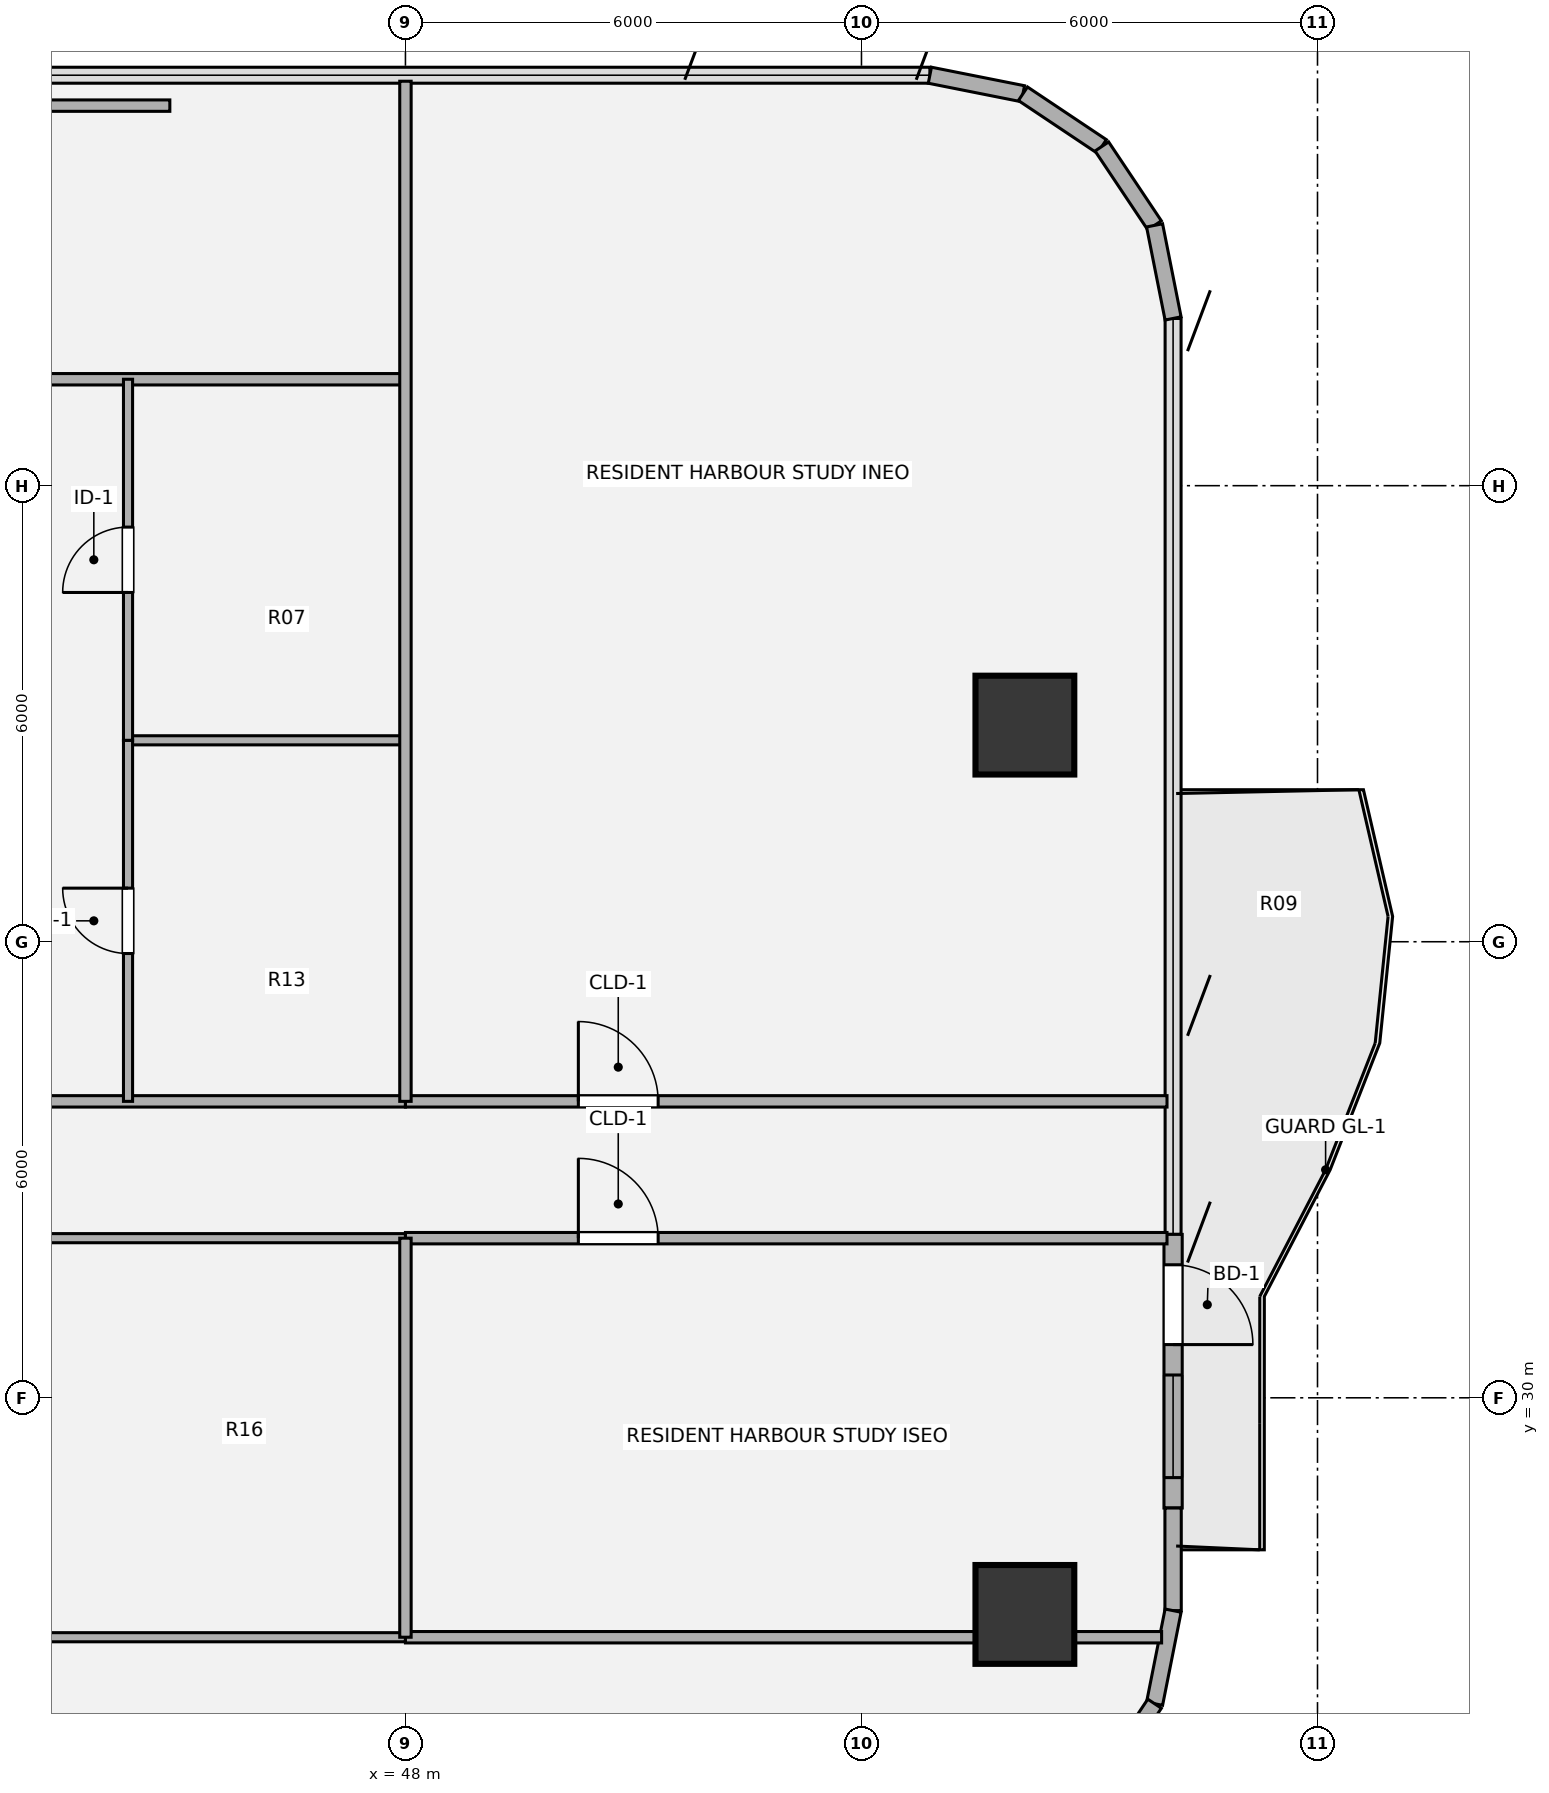
"""IFC4 building model, lengths in metres.
Left out: names, types, materials, properties, quantities, classifications, styles, units other than length and angle.
Written with IfcOpenShell. Run it as: python <this file> out.ifc"""

import sys

from ifc_helpers import new_model, si_unit, direction, frame, frame_2d, origin, origin_2d, place, context, subcontext, project, spatial, rectangle, hollow_circle, extrude, source, transform, mapped, element, fill, save


model = new_model("IFC4")
c1 = context("Model", 3, precision=1e-05, world=origin(), true_north=direction((0.0, 1.0)))
c2 = subcontext(c1, "Body", "Model", "MODEL_VIEW")
j1 = project(units=[si_unit("LENGTHUNIT", "METRE"), si_unit("PLANEANGLEUNIT", "RADIAN")], contexts=[c1])
p1 = place(None, origin())
s1 = spatial("IfcSite", under=j1, at=p1, CompositionType="ELEMENT")
p2 = place(p1, origin())
s2 = spatial("IfcBuilding", under=s1, at=p2, CompositionType="ELEMENT")
p3 = place(p2, frame((0.0, 0.0, 93.6)))
s3 = spatial("IfcBuildingStorey", under=s2, at=p3, CompositionType="ELEMENT", Elevation=93.6)
m1 = source(origin(), c2, "Body", "SweptSolid", [
    extrude(hollow_circle(Radius=0.65, WallThickness=0.045, at=origin_2d()), origin(), (0.0, 0.0, 1.0), 3.78),
])
for number, where, z_axis, x_axis in (
    (1, (56.15, 27.15, 0.0), (0.0, 0.0, 1.0), (1.0, 0.0, 0.0)),
    (2, (56.15, 38.85, 0.0), (0.0, 0.0, 1.0), (1.0, 0.0, 0.0)),
):
    element("IfcColumn", number, at=place(p3, frame(where, z_axis=z_axis, x_axis=x_axis)), inside=s3, PredefinedType="COLUMN", context=c2, shape_type="MappedRepresentation", body=[
        mapped(m1, transform((0.0, 0.0, 0.0), x_axis=(1.0, 0.0, 0.0), y_axis=(0.0, 1.0, 0.0), z_axis=(0.0, 0.0, 1.0), scale=1.0)),
    ])
for number, where, z_axis, x_axis in (
    (3, (54.9, 47.4, 0.0), (0.0, 0.0, 1.0), (0.981, -0.195, 0.0)),
    (4, (56.125, 47.156, 0.0), (0.0, 0.0, 1.0), (0.831, -0.556, 0.0)),
    (5, (57.163, 46.463, 0.0), (0.0, 0.0, 1.0), (0.556, -0.831, 0.0)),
    (6, (57.856, 45.425, 0.0), (0.0, 0.0, 1.0), (0.195, -0.981, 0.0)),
):
    element("IfcWall", number, at=place(p3, frame(where, z_axis=z_axis, x_axis=x_axis)), inside=s3, PredefinedType="SOLIDWALL", context=c2, shape_type="SweptSolid", body=[
        extrude(rectangle(XDim=1.249, YDim=0.215, at=frame_2d((0.624, 0.0))), origin(), (0.0, 0.0, 1.0), 3.53),
    ])
p4 = place(p3, frame((58.1, 32.15, 0.0), z_axis=(0.0, 0.0, 1.0), x_axis=(0.0, -1.0, 0.0)))
e7 = element("IfcWall", 7, at=p4, inside=s3, PredefinedType="SOLIDWALL", context=c2, shape_type="SweptSolid", body=[
    extrude(rectangle(XDim=3.6, YDim=0.24, at=frame_2d((1.8, 0.0))), origin(), (0.0, 0.0, 1.0), 3.53),
])
p5 = place(p4, frame((0.4, 0.0, 0.0)))
e8 = element("IfcOpeningElement", 8, at=p5, cuts=e7, PredefinedType="OPENING", context=c2, shape_type="SweptSolid", body=[
    extrude(rectangle(XDim=1.05, YDim=2.15, at=origin_2d()), frame((0.525, 0.13, 1.075), z_axis=(0.0, -1.0, 0.0), x_axis=(1.0, 0.0, 0.0)), (0.0, 0.0, 1.0), 0.26),
])
p6 = place(p4, frame((1.85, 0.0, 0.85)))
e9 = element("IfcOpeningElement", 9, at=p6, cuts=e7, PredefinedType="OPENING", context=c2, shape_type="SweptSolid", body=[
    extrude(rectangle(XDim=1.35, YDim=1.35, at=origin_2d()), frame((0.675, 0.13, 0.675), z_axis=(0.0, -1.0, 0.0), x_axis=(1.0, 0.0, 0.0)), (0.0, 0.0, 1.0), 0.26),
])
p7 = place(p3, frame((58.1, 28.55, 0.0), z_axis=(0.0, 0.0, 1.0), x_axis=(0.0, -1.0, 0.0)))
e10 = element("IfcWall", 10, at=p7, inside=s3, PredefinedType="SOLIDWALL", context=c2, shape_type="SweptSolid", body=[
    extrude(rectangle(XDim=1.35, YDim=0.215, at=frame_2d((0.675, 0.0))), origin(), (0.0, 0.0, 1.0), 3.53),
])
for number, where, z_axis, x_axis in (
    (11, (58.1, 27.2, 0.0), (0.0, 0.0, 1.0), (-0.195, -0.981, 0.0)),
    (12, (57.856, 25.975, 0.0), (0.0, 0.0, 1.0), (-0.556, -0.831, 0.0)),
):
    element("IfcWall", number, at=place(p3, frame(where, z_axis=z_axis, x_axis=x_axis)), inside=s3, PredefinedType="SOLIDWALL", context=c2, shape_type="SweptSolid", body=[
        extrude(rectangle(XDim=1.249, YDim=0.215, at=frame_2d((0.624, 0.0))), origin(), (0.0, 0.0, 1.0), 3.53),
    ])
p8 = place(p3, frame((43.1, 26.85, 0.0), z_axis=(0.0, 0.0, 1.0), x_axis=(1.0, 0.0, 0.0)))
e13 = element("IfcWall", 13, at=p8, inside=s3, PredefinedType="PARTITIONING", context=c2, shape_type="SweptSolid", body=[
    extrude(rectangle(XDim=4.9, YDim=0.12, at=frame_2d((2.45, 0.0))), origin(), (0.0, 0.0, 1.0), 3.055),
])
p9 = place(p3, frame((48.0, 26.85, 0.0), z_axis=(0.0, 0.0, 1.0), x_axis=(1.0, 0.0, 0.0)))
e14 = element("IfcWall", 14, at=p9, inside=s3, PredefinedType="PARTITIONING", context=c2, shape_type="SweptSolid", body=[
    extrude(rectangle(XDim=9.949, YDim=0.15, at=frame_2d((4.974, 0.0))), origin(), (0.0, 0.0, 1.0), 3.055),
])
p10 = place(p3, frame((43.1, 32.1, 0.0), z_axis=(0.0, 0.0, 1.0), x_axis=(1.0, 0.0, 0.0)))
e15 = element("IfcWall", 15, at=p10, inside=s3, PredefinedType="PARTITIONING", context=c2, shape_type="SweptSolid", body=[
    extrude(rectangle(XDim=4.9, YDim=0.12, at=frame_2d((2.45, 0.0))), origin(), (0.0, 0.0, 1.0), 2.982),
])
p11 = place(p3, frame((48.0, 32.1, 0.0), z_axis=(0.0, 0.0, 1.0), x_axis=(1.0, 0.0, 0.0)))
e16 = element("IfcWall", 16, at=p11, inside=s3, PredefinedType="PARTITIONING", context=c2, shape_type="SweptSolid", body=[
    extrude(rectangle(XDim=10.02, YDim=0.15, at=frame_2d((5.01, 0.0))), origin(), (0.0, 0.0, 1.0), 2.982),
])
p12 = place(p11, frame((2.275, 0.0, 0.0)))
e17 = element("IfcOpeningElement", 17, at=p12, cuts=e16, PredefinedType="OPENING", context=c2, shape_type="SweptSolid", body=[
    extrude(rectangle(XDim=1.05, YDim=2.1, at=origin_2d()), frame((0.525, 0.085, 1.05), z_axis=(0.0, -1.0, 0.0), x_axis=(1.0, 0.0, 0.0)), (0.0, 0.0, 1.0), 0.17),
])
p13 = place(p3, frame((36.9, 33.9, 0.0), z_axis=(0.0, 0.0, 1.0), x_axis=(1.0, 0.0, 0.0)))
e18 = element("IfcWall", 18, at=p13, inside=s3, PredefinedType="PARTITIONING", context=c2, shape_type="SweptSolid", body=[
    extrude(rectangle(XDim=11.1, YDim=0.15, at=frame_2d((5.55, 0.0))), origin(), (0.0, 0.0, 1.0), 2.982),
])
p14 = place(p3, frame((48.0, 33.9, 0.0), z_axis=(0.0, 0.0, 1.0), x_axis=(1.0, 0.0, 0.0)))
e19 = element("IfcWall", 19, at=p14, inside=s3, PredefinedType="PARTITIONING", context=c2, shape_type="SweptSolid", body=[
    extrude(rectangle(XDim=10.02, YDim=0.15, at=frame_2d((5.01, 0.0))), origin(), (0.0, 0.0, 1.0), 2.982),
])
p15 = place(p14, frame((2.275, 0.0, 0.0)))
e20 = element("IfcOpeningElement", 20, at=p15, cuts=e19, PredefinedType="OPENING", context=c2, shape_type="SweptSolid", body=[
    extrude(rectangle(XDim=1.05, YDim=2.1, at=origin_2d()), frame((0.525, 0.085, 1.05), z_axis=(0.0, -1.0, 0.0), x_axis=(1.0, 0.0, 0.0)), (0.0, 0.0, 1.0), 0.17),
])
p16 = place(p3, frame((44.35, 38.65, 0.0), z_axis=(0.0, 0.0, 1.0), x_axis=(1.0, 0.0, 0.0)))
e21 = element("IfcWall", 21, at=p16, inside=s3, PredefinedType="PARTITIONING", context=c2, shape_type="SweptSolid", body=[
    extrude(rectangle(XDim=3.65, YDim=0.12, at=frame_2d((1.825, 0.0))), origin(), (0.0, 0.0, 1.0), 2.903),
])
p17 = place(p3, frame((36.9, 43.4, 0.0), z_axis=(0.0, 0.0, 1.0), x_axis=(1.0, 0.0, 0.0)))
e22 = element("IfcWall", 22, at=p17, inside=s3, PredefinedType="PARTITIONING", context=c2, shape_type="SweptSolid", body=[
    extrude(rectangle(XDim=11.1, YDim=0.15, at=frame_2d((5.55, 0.0))), origin(), (0.0, 0.0, 1.0), 3.308),
])
p18 = place(p3, frame((27.1, 47.0, 0.0), z_axis=(0.0, 0.0, 1.0), x_axis=(1.0, 0.0, 0.0)))
e23 = element("IfcWall", 23, at=p18, inside=s3, PredefinedType="PARTITIONING", context=c2, shape_type="SweptSolid", body=[
    extrude(rectangle(XDim=17.8, YDim=0.15, at=frame_2d((8.9, 0.0))), origin(), (0.0, 0.0, 1.0), 3.308),
])
p19 = place(p18, frame((8.375, 0.0, 0.0)))
e24 = element("IfcOpeningElement", 24, at=p19, cuts=e23, PredefinedType="OPENING", context=c2, shape_type="SweptSolid", body=[
    extrude(rectangle(XDim=1.05, YDim=2.1, at=origin_2d()), frame((0.525, 0.085, 1.05), z_axis=(0.0, -1.0, 0.0), x_axis=(1.0, 0.0, 0.0)), (0.0, 0.0, 1.0), 0.17),
])
p20 = place(p3, frame((44.35, 33.9, 0.0), z_axis=(0.0, 0.0, 1.0), x_axis=(0.0, 1.0, 0.0)))
e25 = element("IfcWall", 25, at=p20, inside=s3, PredefinedType="PARTITIONING", context=c2, shape_type="SweptSolid", body=[
    extrude(rectangle(XDim=4.75, YDim=0.12, at=frame_2d((2.375, 0.0))), origin(), (0.0, 0.0, 1.0), 3.5),
])
p21 = place(p20, frame((1.945, 0.0, 0.0)))
e26 = element("IfcOpeningElement", 26, at=p21, cuts=e25, PredefinedType="OPENING", context=c2, shape_type="SweptSolid", body=[
    extrude(rectangle(XDim=0.86, YDim=2.1, at=origin_2d()), frame((0.43, 0.07, 1.05), z_axis=(0.0, -1.0, 0.0), x_axis=(1.0, 0.0, 0.0)), (0.0, 0.0, 1.0), 0.14),
])
p22 = place(p3, frame((44.35, 38.65, 0.0), z_axis=(0.0, 0.0, 1.0), x_axis=(0.0, 1.0, 0.0)))
e27 = element("IfcWall", 27, at=p22, inside=s3, PredefinedType="PARTITIONING", context=c2, shape_type="SweptSolid", body=[
    extrude(rectangle(XDim=4.75, YDim=0.12, at=frame_2d((2.375, 0.0))), origin(), (0.0, 0.0, 1.0), 3.5),
])
p23 = place(p22, frame((1.945, 0.0, 0.0)))
e28 = element("IfcOpeningElement", 28, at=p23, cuts=e27, PredefinedType="OPENING", context=c2, shape_type="SweptSolid", body=[
    extrude(rectangle(XDim=0.86, YDim=2.1, at=origin_2d()), frame((0.43, 0.07, 1.05), z_axis=(0.0, -1.0, 0.0), x_axis=(1.0, 0.0, 0.0)), (0.0, 0.0, 1.0), 0.14),
])
p24 = place(p3, frame((48.0, 26.85, 0.0), z_axis=(0.0, 0.0, 1.0), x_axis=(0.0, 1.0, 0.0)))
e29 = element("IfcWall", 29, at=p24, inside=s3, PredefinedType="PARTITIONING", context=c2, shape_type="SweptSolid", body=[
    extrude(rectangle(XDim=5.25, YDim=0.15, at=frame_2d((2.625, 0.0))), origin(), (0.0, 0.0, 1.0), 3.5),
])
p25 = place(p3, frame((48.0, 33.9, 0.0), z_axis=(0.0, 0.0, 1.0), x_axis=(0.0, 1.0, 0.0)))
e30 = element("IfcWall", 30, at=p25, inside=s3, PredefinedType="PARTITIONING", context=c2, shape_type="SweptSolid", body=[
    extrude(rectangle(XDim=13.421, YDim=0.15, at=frame_2d((6.71, 0.0))), origin(), (0.0, 0.0, 1.0), 3.5),
])
m2 = source(origin(), c2, "Body", "SweptSolid", [
    extrude(rectangle(XDim=1.05, YDim=2.15, at=origin_2d()), frame((0.525, 0.025, 1.075), z_axis=(0.0, -1.0, 0.0), x_axis=(1.0, 0.0, 0.0)), (0.0, 0.0, 1.0), 0.05),
])
p26 = place(p5, origin())
e31 = element("IfcDoor", 31, at=p26, inside=s3, OperationType="SINGLE_SWING_RIGHT", PredefinedType="DOOR", context=c2, shape_type="MappedRepresentation", body=[
    mapped(m2, transform((0.0, 0.0, 0.0), x_axis=(1.0, 0.0, 0.0), y_axis=(0.0, 1.0, 0.0), z_axis=(0.0, 0.0, 1.0), scale=1.0)),
])
fill(e8, e31)
m3 = source(origin(), c2, "Body", "SweptSolid", [
    extrude(rectangle(XDim=1.35, YDim=1.35, at=origin_2d()), frame((0.675, 0.03, 0.675), z_axis=(0.0, -1.0, 0.0), x_axis=(1.0, 0.0, 0.0)), (0.0, 0.0, 1.0), 0.06),
])
p27 = place(p6, origin())
e32 = element("IfcWindow", 32, at=p27, inside=s3, PartitioningType="SINGLE_PANEL", PredefinedType="WINDOW", context=c2, shape_type="MappedRepresentation", body=[
    mapped(m3, transform((0.0, 0.0, 0.0), x_axis=(1.0, 0.0, 0.0), y_axis=(0.0, 1.0, 0.0), z_axis=(0.0, 0.0, 1.0), scale=1.0)),
])
fill(e9, e32)
m4 = source(origin(), c2, "Body", "SweptSolid", [
    extrude(rectangle(XDim=1.05, YDim=2.1, at=origin_2d()), frame((0.525, 0.025, 1.05), z_axis=(0.0, -1.0, 0.0), x_axis=(1.0, 0.0, 0.0)), (0.0, 0.0, 1.0), 0.05),
])
p28 = place(p12, origin())
e33 = element("IfcDoor", 33, at=p28, inside=s3, OperationType="SINGLE_SWING_LEFT", PredefinedType="DOOR", context=c2, shape_type="MappedRepresentation", body=[
    mapped(m4, transform((0.0, 0.0, 0.0), x_axis=(1.0, 0.0, 0.0), y_axis=(0.0, 1.0, 0.0), z_axis=(0.0, 0.0, 1.0), scale=1.0)),
])
fill(e17, e33)
p29 = place(p15, origin())
e34 = element("IfcDoor", 34, at=p29, inside=s3, OperationType="SINGLE_SWING_LEFT", PredefinedType="DOOR", context=c2, shape_type="MappedRepresentation", body=[
    mapped(m4, transform((0.0, 0.0, 0.0), x_axis=(1.0, 0.0, 0.0), y_axis=(0.0, 1.0, 0.0), z_axis=(0.0, 0.0, 1.0), scale=1.0)),
])
fill(e20, e34)
m5 = source(origin(), c2, "Body", "SweptSolid", [
    extrude(rectangle(XDim=0.86, YDim=2.1, at=origin_2d()), frame((0.43, 0.025, 1.05), z_axis=(0.0, -1.0, 0.0), x_axis=(1.0, 0.0, 0.0)), (0.0, 0.0, 1.0), 0.05),
])
p30 = place(p21, origin())
e35 = element("IfcDoor", 35, at=p30, inside=s3, OperationType="SINGLE_SWING_RIGHT", PredefinedType="DOOR", context=c2, shape_type="MappedRepresentation", body=[
    mapped(m5, transform((0.0, 0.0, 0.0), x_axis=(1.0, 0.0, 0.0), y_axis=(0.0, 1.0, 0.0), z_axis=(0.0, 0.0, 1.0), scale=1.0)),
])
fill(e26, e35)
p31 = place(p23, origin())
e36 = element("IfcDoor", 36, at=p31, inside=s3, OperationType="SINGLE_SWING_LEFT", PredefinedType="DOOR", context=c2, shape_type="MappedRepresentation", body=[
    mapped(m5, transform((0.0, 0.0, 0.0), x_axis=(1.0, 0.0, 0.0), y_axis=(0.0, 1.0, 0.0), z_axis=(0.0, 0.0, 1.0), scale=1.0)),
])
fill(e28, e36)
save(model, sys.argv[1])
